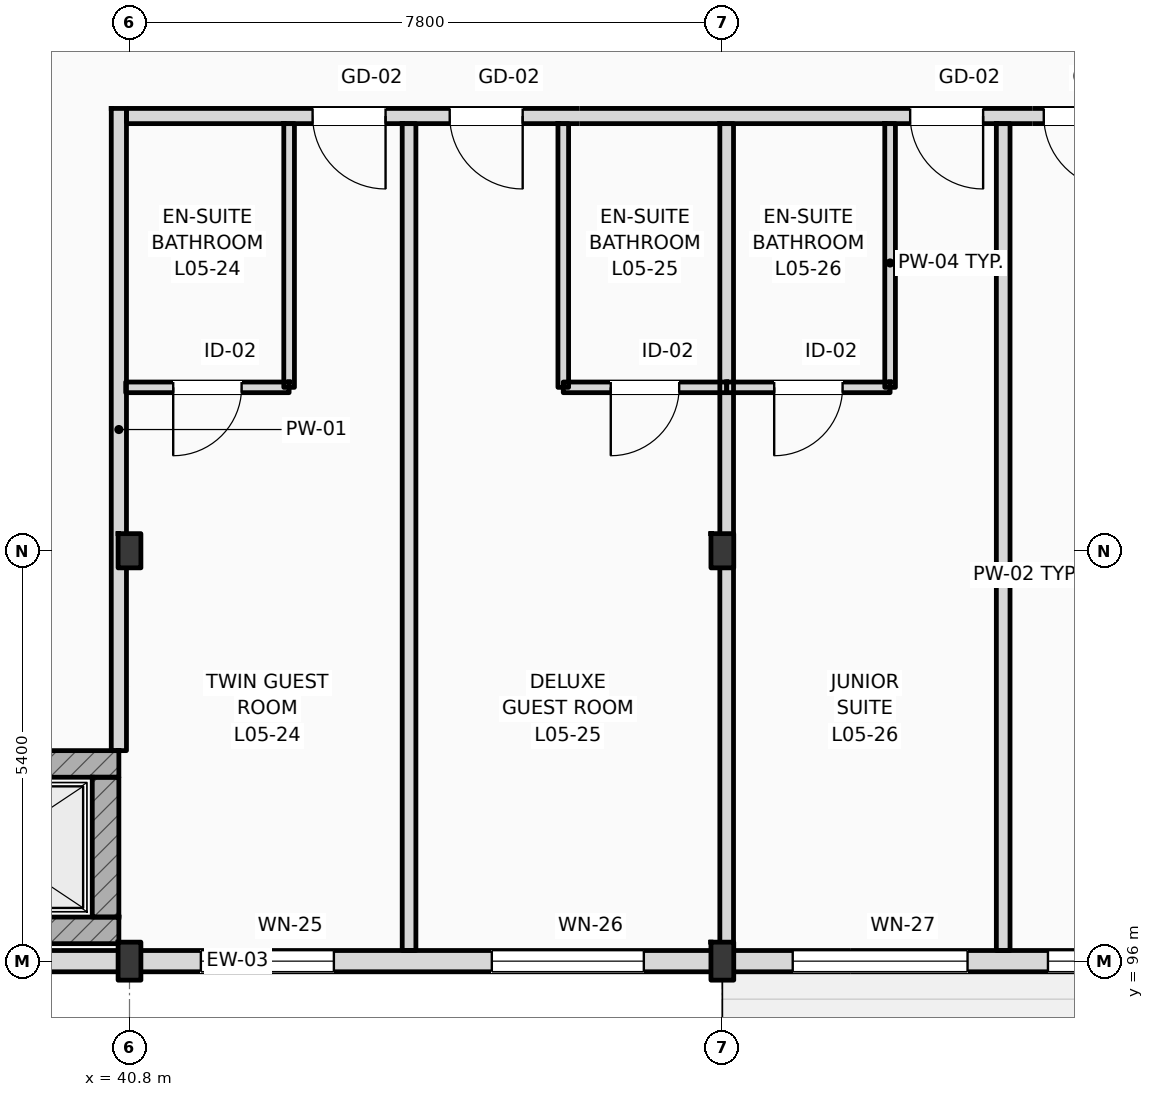
"""IFC4 building model, lengths in metres.
Left out: names, types, materials, properties, quantities, classifications, styles, units other than length and angle.
Written with IfcOpenShell. Run it as: python <this file> out.ifc"""

import sys

from ifc_helpers import new_model, si_unit, direction, frame, frame_2d, origin, origin_2d, place, context, subcontext, project, spatial, rectangle, i_section, extrude, element, fill, save


model = new_model("IFC4")
c1 = context("Model", 3, precision=1e-05, world=origin(), true_north=direction((0.0, 1.0)))
c2 = subcontext(c1, "Body", "Model", "MODEL_VIEW")
j1 = project(units=[si_unit("LENGTHUNIT", "METRE"), si_unit("PLANEANGLEUNIT", "RADIAN")], contexts=[c1])
p1 = place(None, origin())
s1 = spatial("IfcSite", under=j1, at=p1, CompositionType="ELEMENT")
p2 = place(p1, origin())
s2 = spatial("IfcBuilding", under=s1, at=p2, CompositionType="ELEMENT")
p3 = place(p2, frame((0.0, 0.0, 24.6)))
s3 = spatial("IfcBuildingStorey", under=s2, at=p3, CompositionType="ELEMENT", Elevation=24.6)
p4 = place(p3, frame((40.8, 96.0, 0.0), z_axis=(0.0, 0.0, 1.0), x_axis=(1.0, 0.0, 0.0)))
e1 = element("IfcColumn", 1, at=p4, inside=s3, PredefinedType="COLUMN", context=c2, shape_type="SweptSolid", body=[
    extrude(i_section(OverallWidth=0.3, OverallDepth=0.5, WebThickness=0.014, FlangeThickness=0.028, FilletRadius=0.027, at=origin_2d()), origin(), (0.0, 0.0, 1.0), 3.6),
])
p5 = place(p3, frame((40.8, 101.4, 0.0), z_axis=(0.0, 0.0, 1.0), x_axis=(1.0, 0.0, 0.0)))
e2 = element("IfcColumn", 2, at=p5, inside=s3, PredefinedType="COLUMN", context=c2, shape_type="SweptSolid", body=[
    extrude(i_section(OverallWidth=0.3, OverallDepth=0.45, WebThickness=0.014, FlangeThickness=0.026, FilletRadius=0.027, at=origin_2d()), origin(), (0.0, 0.0, 1.0), 3.6),
])
p6 = place(p3, frame((48.6, 96.0, 0.0), z_axis=(0.0, 0.0, 1.0), x_axis=(1.0, 0.0, 0.0)))
e3 = element("IfcColumn", 3, at=p6, inside=s3, PredefinedType="COLUMN", context=c2, shape_type="SweptSolid", body=[
    extrude(i_section(OverallWidth=0.3, OverallDepth=0.5, WebThickness=0.014, FlangeThickness=0.028, FilletRadius=0.027, at=origin_2d()), origin(), (0.0, 0.0, 1.0), 3.6),
])
p7 = place(p3, frame((48.6, 101.4, 0.0), z_axis=(0.0, 0.0, 1.0), x_axis=(1.0, 0.0, 0.0)))
e4 = element("IfcColumn", 4, at=p7, inside=s3, PredefinedType="COLUMN", context=c2, shape_type="SweptSolid", body=[
    extrude(i_section(OverallWidth=0.3, OverallDepth=0.45, WebThickness=0.014, FlangeThickness=0.026, FilletRadius=0.027, at=origin_2d()), origin(), (0.0, 0.0, 1.0), 3.6),
])
p8 = place(p3, frame((25.2, 96.0, 0.0), z_axis=(0.0, 0.0, 1.0), x_axis=(1.0, 0.0, 0.0)))
e5 = element("IfcWall", 5, at=p8, inside=s3, PredefinedType="STANDARD", context=c2, shape_type="SweptSolid", body=[
    extrude(rectangle(XDim=94.8, YDim=0.28, at=frame_2d((47.4, 0.0))), origin(), (0.0, 0.0, 1.0), 2.78),
])
p9 = place(p8, frame((16.539, 0.0, 0.9)))
e6 = element("IfcOpeningElement", 6, at=p9, cuts=e5, PredefinedType="OPENING", context=c2, shape_type="SweptSolid", body=[
    extrude(rectangle(XDim=1.75, YDim=1.7, at=frame_2d((0.875, 0.85))), frame((0.0, 0.15, 0.0), z_axis=(0.0, -1.0, 0.0), x_axis=(1.0, 0.0, 0.0)), (0.0, 0.0, 1.0), 0.3),
])
p10 = place(p8, frame((20.367, 0.0, 0.9)))
e7 = element("IfcOpeningElement", 7, at=p10, cuts=e5, PredefinedType="OPENING", context=c2, shape_type="SweptSolid", body=[
    extrude(rectangle(XDim=2.0, YDim=1.7, at=frame_2d((1.0, 0.85))), frame((0.0, 0.15, 0.0), z_axis=(0.0, -1.0, 0.0), x_axis=(1.0, 0.0, 0.0)), (0.0, 0.0, 1.0), 0.3),
])
p11 = place(p8, frame((24.326, 0.0, 0.9)))
e8 = element("IfcOpeningElement", 8, at=p11, cuts=e5, PredefinedType="OPENING", context=c2, shape_type="SweptSolid", body=[
    extrude(rectangle(XDim=2.3, YDim=1.7, at=frame_2d((1.15, 0.85))), frame((0.0, 0.15, 0.0), z_axis=(0.0, -1.0, 0.0), x_axis=(1.0, 0.0, 0.0)), (0.0, 0.0, 1.0), 0.3),
])
p12 = place(p8, frame((27.684, 0.0, 0.9)))
e9 = element("IfcOpeningElement", 9, at=p12, cuts=e5, PredefinedType="OPENING", context=c2, shape_type="SweptSolid", body=[
    extrude(rectangle(XDim=2.6, YDim=1.7, at=frame_2d((1.3, 0.85))), frame((0.0, 0.15, 0.0), z_axis=(0.0, -1.0, 0.0), x_axis=(1.0, 0.0, 0.0)), (0.0, 0.0, 1.0), 0.3),
])
p13 = place(p8, frame((32.083, 0.0, 0.9)))
e10 = element("IfcOpeningElement", 10, at=p13, cuts=e5, PredefinedType="OPENING", context=c2, shape_type="SweptSolid", body=[
    extrude(rectangle(XDim=2.419, YDim=1.7, at=frame_2d((1.209, 0.85))), frame((0.0, 0.15, 0.0), z_axis=(0.0, -1.0, 0.0), x_axis=(1.0, 0.0, 0.0)), (0.0, 0.0, 1.0), 0.3),
])
p14 = place(p8, frame((35.322, 0.0, 0.9)))
e11 = element("IfcOpeningElement", 11, at=p14, cuts=e5, PredefinedType="OPENING", context=c2, shape_type="SweptSolid", body=[
    extrude(rectangle(XDim=2.868, YDim=1.7, at=frame_2d((1.434, 0.85))), frame((0.0, 0.15, 0.0), z_axis=(0.0, -1.0, 0.0), x_axis=(1.0, 0.0, 0.0)), (0.0, 0.0, 1.0), 0.3),
])
p15 = place(p8, frame((56.015, 0.0, 0.9)))
e12 = element("IfcOpeningElement", 12, at=p15, cuts=e5, PredefinedType="OPENING", context=c2, shape_type="SweptSolid", body=[
    extrude(rectangle(XDim=1.2, YDim=1.7, at=frame_2d((0.6, 0.85))), frame((0.0, 0.15, 0.0), z_axis=(0.0, -1.0, 0.0), x_axis=(1.0, 0.0, 0.0)), (0.0, 0.0, 1.0), 0.3),
])
p16 = place(p8, frame((59.888, 0.0, 0.9)))
e13 = element("IfcOpeningElement", 13, at=p16, cuts=e5, PredefinedType="OPENING", context=c2, shape_type="SweptSolid", body=[
    extrude(rectangle(XDim=1.35, YDim=1.7, at=frame_2d((0.675, 0.85))), frame((0.0, 0.15, 0.0), z_axis=(0.0, -1.0, 0.0), x_axis=(1.0, 0.0, 0.0)), (0.0, 0.0, 1.0), 0.3),
])
p17 = place(p8, frame((63.799, 0.0, 0.9)))
e14 = element("IfcOpeningElement", 14, at=p17, cuts=e5, PredefinedType="OPENING", context=c2, shape_type="SweptSolid", body=[
    extrude(rectangle(XDim=1.5, YDim=1.7, at=frame_2d((0.75, 0.85))), frame((0.0, 0.15, 0.0), z_axis=(0.0, -1.0, 0.0), x_axis=(1.0, 0.0, 0.0)), (0.0, 0.0, 1.0), 0.3),
])
p18 = place(p8, frame((67.709, 0.0, 0.9)))
e15 = element("IfcOpeningElement", 15, at=p18, cuts=e5, PredefinedType="OPENING", context=c2, shape_type="SweptSolid", body=[
    extrude(rectangle(XDim=1.65, YDim=1.7, at=frame_2d((0.825, 0.85))), frame((0.0, 0.15, 0.0), z_axis=(0.0, -1.0, 0.0), x_axis=(1.0, 0.0, 0.0)), (0.0, 0.0, 1.0), 0.3),
])
p19 = place(p8, frame((71.618, 0.0, 0.9)))
e16 = element("IfcOpeningElement", 16, at=p19, cuts=e5, PredefinedType="OPENING", context=c2, shape_type="SweptSolid", body=[
    extrude(rectangle(XDim=1.8, YDim=1.7, at=frame_2d((0.9, 0.85))), frame((0.0, 0.15, 0.0), z_axis=(0.0, -1.0, 0.0), x_axis=(1.0, 0.0, 0.0)), (0.0, 0.0, 1.0), 0.3),
])
p20 = place(p8, frame((75.129, 0.0, 0.9)))
e17 = element("IfcOpeningElement", 17, at=p20, cuts=e5, PredefinedType="OPENING", context=c2, shape_type="SweptSolid", body=[
    extrude(rectangle(XDim=1.95, YDim=1.7, at=frame_2d((0.975, 0.85))), frame((0.0, 0.15, 0.0), z_axis=(0.0, -1.0, 0.0), x_axis=(1.0, 0.0, 0.0)), (0.0, 0.0, 1.0), 0.3),
])
p21 = place(p8, frame((79.439, 0.0, 0.9)))
e18 = element("IfcOpeningElement", 18, at=p21, cuts=e5, PredefinedType="OPENING", context=c2, shape_type="SweptSolid", body=[
    extrude(rectangle(XDim=2.1, YDim=1.7, at=frame_2d((1.05, 0.85))), frame((0.0, 0.15, 0.0), z_axis=(0.0, -1.0, 0.0), x_axis=(1.0, 0.0, 0.0)), (0.0, 0.0, 1.0), 0.3),
])
p22 = place(p8, frame((83.349, 0.0, 0.9)))
e19 = element("IfcOpeningElement", 19, at=p22, cuts=e5, PredefinedType="OPENING", context=c2, shape_type="SweptSolid", body=[
    extrude(rectangle(XDim=2.25, YDim=1.7, at=frame_2d((1.125, 0.85))), frame((0.0, 0.15, 0.0), z_axis=(0.0, -1.0, 0.0), x_axis=(1.0, 0.0, 0.0)), (0.0, 0.0, 1.0), 0.3),
])
p23 = place(p8, frame((87.258, 0.0, 0.9)))
e20 = element("IfcOpeningElement", 20, at=p23, cuts=e5, PredefinedType="OPENING", context=c2, shape_type="SweptSolid", body=[
    extrude(rectangle(XDim=2.4, YDim=1.7, at=frame_2d((1.2, 0.85))), frame((0.0, 0.15, 0.0), z_axis=(0.0, -1.0, 0.0), x_axis=(1.0, 0.0, 0.0)), (0.0, 0.0, 1.0), 0.3),
])
p24 = place(p8, frame((91.204, 0.0, 0.9)))
e21 = element("IfcOpeningElement", 21, at=p24, cuts=e5, PredefinedType="OPENING", context=c2, shape_type="SweptSolid", body=[
    extrude(rectangle(XDim=2.55, YDim=1.7, at=frame_2d((1.275, 0.85))), frame((0.0, 0.15, 0.0), z_axis=(0.0, -1.0, 0.0), x_axis=(1.0, 0.0, 0.0)), (0.0, 0.0, 1.0), 0.3),
])
p25 = place(p3, frame((37.67, 98.595, 0.0), z_axis=(0.0, 0.0, 1.0), x_axis=(1.0, 0.0, 0.0)))
e22 = element("IfcWall", 22, at=p25, inside=s3, PredefinedType="SHEAR", context=c2, shape_type="SweptSolid", body=[
    extrude(rectangle(XDim=2.99, YDim=0.35, at=frame_2d((1.495, 0.0))), origin(), (0.0, 0.0, 1.0), 3.34),
])
p26 = place(p25, frame((0.695, 0.0, 0.0)))
e23 = element("IfcOpeningElement", 23, at=p26, cuts=e22, PredefinedType="OPENING", context=c2, shape_type="SweptSolid", body=[
    extrude(rectangle(XDim=1.25, YDim=2.25, at=frame_2d((0.625, 1.125))), frame((0.0, 0.185, 0.0), z_axis=(0.0, -1.0, 0.0), x_axis=(1.0, 0.0, 0.0)), (0.0, 0.0, 1.0), 0.37),
])
p27 = place(p3, frame((37.67, 96.405, 0.0), z_axis=(0.0, 0.0, 1.0), x_axis=(1.0, 0.0, 0.0)))
e24 = element("IfcWall", 24, at=p27, inside=s3, PredefinedType="SHEAR", context=c2, shape_type="SweptSolid", body=[
    extrude(rectangle(XDim=2.99, YDim=0.35, at=frame_2d((1.495, 0.0))), origin(), (0.0, 0.0, 1.0), 3.34),
])
p28 = place(p3, frame((40.485, 96.58, 0.0), z_axis=(0.0, 0.0, 1.0), x_axis=(0.0, 1.0, 0.0)))
e25 = element("IfcWall", 25, at=p28, inside=s3, PredefinedType="SHEAR", context=c2, shape_type="SweptSolid", body=[
    extrude(rectangle(XDim=1.84, YDim=0.35, at=frame_2d((0.92, 0.0))), origin(), (0.0, 0.0, 1.0), 2.93),
])
p29 = place(p3, frame((40.76, 107.12, 0.0), z_axis=(0.0, 0.0, 1.0), x_axis=(1.0, 0.0, 0.0)))
e26 = element("IfcWall", 26, at=p29, inside=s3, PredefinedType="PARTITIONING", context=c2, shape_type="SweptSolid", body=[
    extrude(rectangle(XDim=23.44, YDim=0.2, at=frame_2d((11.72, 0.0))), origin(), (0.0, 0.0, 1.0), 3.34),
])
p30 = place(p29, frame((2.449, 0.0, 0.0)))
e27 = element("IfcOpeningElement", 27, at=p30, cuts=e26, PredefinedType="OPENING", context=c2, shape_type="SweptSolid", body=[
    extrude(rectangle(XDim=0.96, YDim=2.2, at=frame_2d((0.48, 1.1))), frame((0.0, 0.11, 0.0), z_axis=(0.0, -1.0, 0.0), x_axis=(1.0, 0.0, 0.0)), (0.0, 0.0, 1.0), 0.22),
])
p31 = place(p29, frame((4.253, 0.0, 0.0)))
e28 = element("IfcOpeningElement", 28, at=p31, cuts=e26, PredefinedType="OPENING", context=c2, shape_type="SweptSolid", body=[
    extrude(rectangle(XDim=0.96, YDim=2.2, at=frame_2d((0.48, 1.1))), frame((0.0, 0.11, 0.0), z_axis=(0.0, -1.0, 0.0), x_axis=(1.0, 0.0, 0.0)), (0.0, 0.0, 1.0), 0.22),
])
p32 = place(p29, frame((10.311, 0.0, 0.0)))
e29 = element("IfcOpeningElement", 29, at=p32, cuts=e26, PredefinedType="OPENING", context=c2, shape_type="SweptSolid", body=[
    extrude(rectangle(XDim=0.96, YDim=2.2, at=frame_2d((0.48, 1.1))), frame((0.0, 0.11, 0.0), z_axis=(0.0, -1.0, 0.0), x_axis=(1.0, 0.0, 0.0)), (0.0, 0.0, 1.0), 0.22),
])
p33 = place(p29, frame((12.069, 0.0, 0.0)))
e30 = element("IfcOpeningElement", 30, at=p33, cuts=e26, PredefinedType="OPENING", context=c2, shape_type="SweptSolid", body=[
    extrude(rectangle(XDim=0.96, YDim=2.2, at=frame_2d((0.48, 1.1))), frame((0.0, 0.11, 0.0), z_axis=(0.0, -1.0, 0.0), x_axis=(1.0, 0.0, 0.0)), (0.0, 0.0, 1.0), 0.22),
])
p34 = place(p29, frame((18.128, 0.0, 0.0)))
e31 = element("IfcOpeningElement", 31, at=p34, cuts=e26, PredefinedType="OPENING", context=c2, shape_type="SweptSolid", body=[
    extrude(rectangle(XDim=0.96, YDim=2.2, at=frame_2d((0.48, 1.1))), frame((0.0, 0.11, 0.0), z_axis=(0.0, -1.0, 0.0), x_axis=(1.0, 0.0, 0.0)), (0.0, 0.0, 1.0), 0.22),
])
p35 = place(p29, frame((19.841, 0.0, 0.0)))
e32 = element("IfcOpeningElement", 32, at=p35, cuts=e26, PredefinedType="OPENING", context=c2, shape_type="SweptSolid", body=[
    extrude(rectangle(XDim=0.96, YDim=2.2, at=frame_2d((0.48, 1.1))), frame((0.0, 0.11, 0.0), z_axis=(0.0, -1.0, 0.0), x_axis=(1.0, 0.0, 0.0)), (0.0, 0.0, 1.0), 0.22),
])
p36 = place(p3, frame((40.66, 98.77, 0.0), z_axis=(0.0, 0.0, 1.0), x_axis=(0.0, 1.0, 0.0)))
e33 = element("IfcWall", 33, at=p36, inside=s3, PredefinedType="PARTITIONING", context=c2, shape_type="SweptSolid", body=[
    extrude(rectangle(XDim=8.45, YDim=0.2, at=frame_2d((4.225, 0.0))), origin(), (0.0, 0.0, 1.0), 2.93),
])
p37 = place(p3, frame((44.478, 96.14, 0.0), z_axis=(0.0, 0.0, 1.0), x_axis=(0.0, 1.0, 0.0)))
e34 = element("IfcWall", 34, at=p37, inside=s3, PredefinedType="PARTITIONING", context=c2, shape_type="SweptSolid", body=[
    extrude(rectangle(XDim=10.88, YDim=0.18, at=frame_2d((5.44, 0.0))), origin(), (0.0, 0.0, 1.0), 3.34),
])
p38 = place(p3, frame((42.9, 103.55, 0.0), z_axis=(0.0, 0.0, 1.0), x_axis=(0.0, 1.0, 0.0)))
e35 = element("IfcWall", 35, at=p38, inside=s3, PredefinedType="PARTITIONING", context=c2, shape_type="SweptSolid", body=[
    extrude(rectangle(XDim=3.47, YDim=0.14, at=frame_2d((1.735, 0.0))), origin(), (0.0, 0.0, 1.0), 3.34),
])
p39 = place(p3, frame((40.75, 103.55, 0.0), z_axis=(0.0, 0.0, 1.0), x_axis=(1.0, 0.0, 0.0)))
e36 = element("IfcWall", 36, at=p39, inside=s3, PredefinedType="PARTITIONING", context=c2, shape_type="SweptSolid", body=[
    extrude(rectangle(XDim=2.15, YDim=0.14, at=frame_2d((1.075, 0.0))), origin(), (0.0, 0.0, 1.0), 3.34),
])
p40 = place(p39, frame((0.625, 0.0, 0.0)))
e37 = element("IfcOpeningElement", 37, at=p40, cuts=e36, PredefinedType="OPENING", context=c2, shape_type="SweptSolid", body=[
    extrude(rectangle(XDim=0.9, YDim=2.1, at=frame_2d((0.45, 1.05))), frame((0.0, 0.08, 0.0), z_axis=(0.0, -1.0, 0.0), x_axis=(1.0, 0.0, 0.0)), (0.0, 0.0, 1.0), 0.16),
])
p41 = place(p3, frame((48.657, 96.14, 0.0), z_axis=(0.0, 0.0, 1.0), x_axis=(0.0, 1.0, 0.0)))
e38 = element("IfcWall", 38, at=p41, inside=s3, PredefinedType="PARTITIONING", context=c2, shape_type="SweptSolid", body=[
    extrude(rectangle(XDim=10.88, YDim=0.18, at=frame_2d((5.44, 0.0))), origin(), (0.0, 0.0, 1.0), 2.93),
])
p42 = place(p3, frame((46.507, 103.55, 0.0), z_axis=(0.0, 0.0, 1.0), x_axis=(0.0, 1.0, 0.0)))
e39 = element("IfcWall", 39, at=p42, inside=s3, PredefinedType="PARTITIONING", context=c2, shape_type="SweptSolid", body=[
    extrude(rectangle(XDim=3.47, YDim=0.14, at=frame_2d((1.735, 0.0))), origin(), (0.0, 0.0, 1.0), 3.34),
])
p43 = place(p3, frame((46.507, 103.55, 0.0), z_axis=(0.0, 0.0, 1.0), x_axis=(1.0, 0.0, 0.0)))
e40 = element("IfcWall", 40, at=p43, inside=s3, PredefinedType="PARTITIONING", context=c2, shape_type="SweptSolid", body=[
    extrude(rectangle(XDim=2.15, YDim=0.14, at=frame_2d((1.075, 0.0))), origin(), (0.0, 0.0, 1.0), 3.34),
])
p44 = place(p43, frame((0.625, 0.0, 0.0)))
e41 = element("IfcOpeningElement", 41, at=p44, cuts=e40, PredefinedType="OPENING", context=c2, shape_type="SweptSolid", body=[
    extrude(rectangle(XDim=0.9, YDim=2.1, at=frame_2d((0.45, 1.05))), frame((0.0, 0.08, 0.0), z_axis=(0.0, -1.0, 0.0), x_axis=(1.0, 0.0, 0.0)), (0.0, 0.0, 1.0), 0.16),
])
p45 = place(p3, frame((52.295, 96.14, 0.0), z_axis=(0.0, 0.0, 1.0), x_axis=(0.0, 1.0, 0.0)))
e42 = element("IfcWall", 42, at=p45, inside=s3, PredefinedType="PARTITIONING", context=c2, shape_type="SweptSolid", body=[
    extrude(rectangle(XDim=10.88, YDim=0.18, at=frame_2d((5.44, 0.0))), origin(), (0.0, 0.0, 1.0), 3.34),
])
p46 = place(p3, frame((50.807, 103.55, 0.0), z_axis=(0.0, 0.0, 1.0), x_axis=(0.0, 1.0, 0.0)))
e43 = element("IfcWall", 43, at=p46, inside=s3, PredefinedType="PARTITIONING", context=c2, shape_type="SweptSolid", body=[
    extrude(rectangle(XDim=3.47, YDim=0.14, at=frame_2d((1.735, 0.0))), origin(), (0.0, 0.0, 1.0), 3.34),
])
p47 = place(p3, frame((48.657, 103.55, 0.0), z_axis=(0.0, 0.0, 1.0), x_axis=(1.0, 0.0, 0.0)))
e44 = element("IfcWall", 44, at=p47, inside=s3, PredefinedType="PARTITIONING", context=c2, shape_type="SweptSolid", body=[
    extrude(rectangle(XDim=2.15, YDim=0.14, at=frame_2d((1.075, 0.0))), origin(), (0.0, 0.0, 1.0), 3.34),
])
p48 = place(p47, frame((0.625, 0.0, 0.0)))
e45 = element("IfcOpeningElement", 45, at=p48, cuts=e44, PredefinedType="OPENING", context=c2, shape_type="SweptSolid", body=[
    extrude(rectangle(XDim=0.9, YDim=2.1, at=frame_2d((0.45, 1.05))), frame((0.0, 0.08, 0.0), z_axis=(0.0, -1.0, 0.0), x_axis=(1.0, 0.0, 0.0)), (0.0, 0.0, 1.0), 0.16),
])
p49 = place(p9, origin())
e46 = element("IfcWindow", 46, at=p49, inside=s3, PartitioningType="DOUBLE_PANEL_VERTICAL", PredefinedType="WINDOW", context=c2, shape_type="SweptSolid", body=[
    extrude(rectangle(XDim=1.75, YDim=1.7, at=frame_2d((0.875, 0.85))), frame((0.0, 0.03, 0.0), z_axis=(0.0, -1.0, 0.0), x_axis=(1.0, 0.0, 0.0)), (0.0, 0.0, 1.0), 0.06),
])
fill(e6, e46)
p50 = place(p10, origin())
e47 = element("IfcWindow", 47, at=p50, inside=s3, PartitioningType="DOUBLE_PANEL_VERTICAL", PredefinedType="WINDOW", context=c2, shape_type="SweptSolid", body=[
    extrude(rectangle(XDim=2.0, YDim=1.7, at=frame_2d((1.0, 0.85))), frame((0.0, 0.03, 0.0), z_axis=(0.0, -1.0, 0.0), x_axis=(1.0, 0.0, 0.0)), (0.0, 0.0, 1.0), 0.06),
])
fill(e7, e47)
p51 = place(p11, origin())
e48 = element("IfcWindow", 48, at=p51, inside=s3, PartitioningType="DOUBLE_PANEL_VERTICAL", PredefinedType="WINDOW", context=c2, shape_type="SweptSolid", body=[
    extrude(rectangle(XDim=2.3, YDim=1.7, at=frame_2d((1.15, 0.85))), frame((0.0, 0.03, 0.0), z_axis=(0.0, -1.0, 0.0), x_axis=(1.0, 0.0, 0.0)), (0.0, 0.0, 1.0), 0.06),
])
fill(e8, e48)
p52 = place(p12, origin())
e49 = element("IfcWindow", 49, at=p52, inside=s3, PartitioningType="DOUBLE_PANEL_VERTICAL", PredefinedType="WINDOW", context=c2, shape_type="SweptSolid", body=[
    extrude(rectangle(XDim=2.6, YDim=1.7, at=frame_2d((1.3, 0.85))), frame((0.0, 0.03, 0.0), z_axis=(0.0, -1.0, 0.0), x_axis=(1.0, 0.0, 0.0)), (0.0, 0.0, 1.0), 0.06),
])
fill(e9, e49)
p53 = place(p30, frame((0.96, 0.0, 0.0), z_axis=(0.0, 0.0, 1.0), x_axis=(-1.0, 0.0, 0.0)))
e50 = element("IfcDoor", 50, at=p53, inside=s3, OperationType="SINGLE_SWING_RIGHT", PredefinedType="DOOR", context=c2, shape_type="SweptSolid", body=[
    extrude(rectangle(XDim=0.96, YDim=2.2, at=frame_2d((0.48, 1.1))), frame((0.0, 0.025, 0.0), z_axis=(0.0, -1.0, 0.0), x_axis=(1.0, 0.0, 0.0)), (0.0, 0.0, 1.0), 0.05),
])
fill(e27, e50)
p54 = place(p40, frame((0.9, 0.0, 0.0), z_axis=(0.0, 0.0, 1.0), x_axis=(-1.0, 0.0, 0.0)))
e51 = element("IfcDoor", 51, at=p54, inside=s3, OperationType="SINGLE_SWING_LEFT", PredefinedType="DOOR", context=c2, shape_type="SweptSolid", body=[
    extrude(rectangle(XDim=0.9, YDim=2.1, at=frame_2d((0.45, 1.05))), frame((0.0, 0.025, 0.0), z_axis=(0.0, -1.0, 0.0), x_axis=(1.0, 0.0, 0.0)), (0.0, 0.0, 1.0), 0.05),
])
fill(e37, e51)
p55 = place(p31, frame((0.96, 0.0, 0.0), z_axis=(0.0, 0.0, 1.0), x_axis=(-1.0, 0.0, 0.0)))
e52 = element("IfcDoor", 52, at=p55, inside=s3, OperationType="SINGLE_SWING_RIGHT", PredefinedType="DOOR", context=c2, shape_type="SweptSolid", body=[
    extrude(rectangle(XDim=0.96, YDim=2.2, at=frame_2d((0.48, 1.1))), frame((0.0, 0.025, 0.0), z_axis=(0.0, -1.0, 0.0), x_axis=(1.0, 0.0, 0.0)), (0.0, 0.0, 1.0), 0.05),
])
fill(e28, e52)
p56 = place(p44, frame((0.9, 0.0, 0.0), z_axis=(0.0, 0.0, 1.0), x_axis=(-1.0, 0.0, 0.0)))
e53 = element("IfcDoor", 53, at=p56, inside=s3, OperationType="SINGLE_SWING_LEFT", PredefinedType="DOOR", context=c2, shape_type="SweptSolid", body=[
    extrude(rectangle(XDim=0.9, YDim=2.1, at=frame_2d((0.45, 1.05))), frame((0.0, 0.025, 0.0), z_axis=(0.0, -1.0, 0.0), x_axis=(1.0, 0.0, 0.0)), (0.0, 0.0, 1.0), 0.05),
])
fill(e41, e53)
p57 = place(p32, frame((0.96, 0.0, 0.0), z_axis=(0.0, 0.0, 1.0), x_axis=(-1.0, 0.0, 0.0)))
e54 = element("IfcDoor", 54, at=p57, inside=s3, OperationType="SINGLE_SWING_RIGHT", PredefinedType="DOOR", context=c2, shape_type="SweptSolid", body=[
    extrude(rectangle(XDim=0.96, YDim=2.2, at=frame_2d((0.48, 1.1))), frame((0.0, 0.025, 0.0), z_axis=(0.0, -1.0, 0.0), x_axis=(1.0, 0.0, 0.0)), (0.0, 0.0, 1.0), 0.05),
])
fill(e29, e54)
p58 = place(p48, frame((0.9, 0.0, 0.0), z_axis=(0.0, 0.0, 1.0), x_axis=(-1.0, 0.0, 0.0)))
e55 = element("IfcDoor", 55, at=p58, inside=s3, OperationType="SINGLE_SWING_LEFT", PredefinedType="DOOR", context=c2, shape_type="SweptSolid", body=[
    extrude(rectangle(XDim=0.9, YDim=2.1, at=frame_2d((0.45, 1.05))), frame((0.0, 0.025, 0.0), z_axis=(0.0, -1.0, 0.0), x_axis=(1.0, 0.0, 0.0)), (0.0, 0.0, 1.0), 0.05),
])
fill(e45, e55)
p59 = place(p33, frame((0.96, 0.0, 0.0), z_axis=(0.0, 0.0, 1.0), x_axis=(-1.0, 0.0, 0.0)))
e56 = element("IfcDoor", 56, at=p59, inside=s3, OperationType="SINGLE_SWING_RIGHT", PredefinedType="DOOR", context=c2, shape_type="SweptSolid", body=[
    extrude(rectangle(XDim=0.96, YDim=2.2, at=frame_2d((0.48, 1.1))), frame((0.0, 0.025, 0.0), z_axis=(0.0, -1.0, 0.0), x_axis=(1.0, 0.0, 0.0)), (0.0, 0.0, 1.0), 0.05),
])
fill(e30, e56)
save(model, sys.argv[1])
